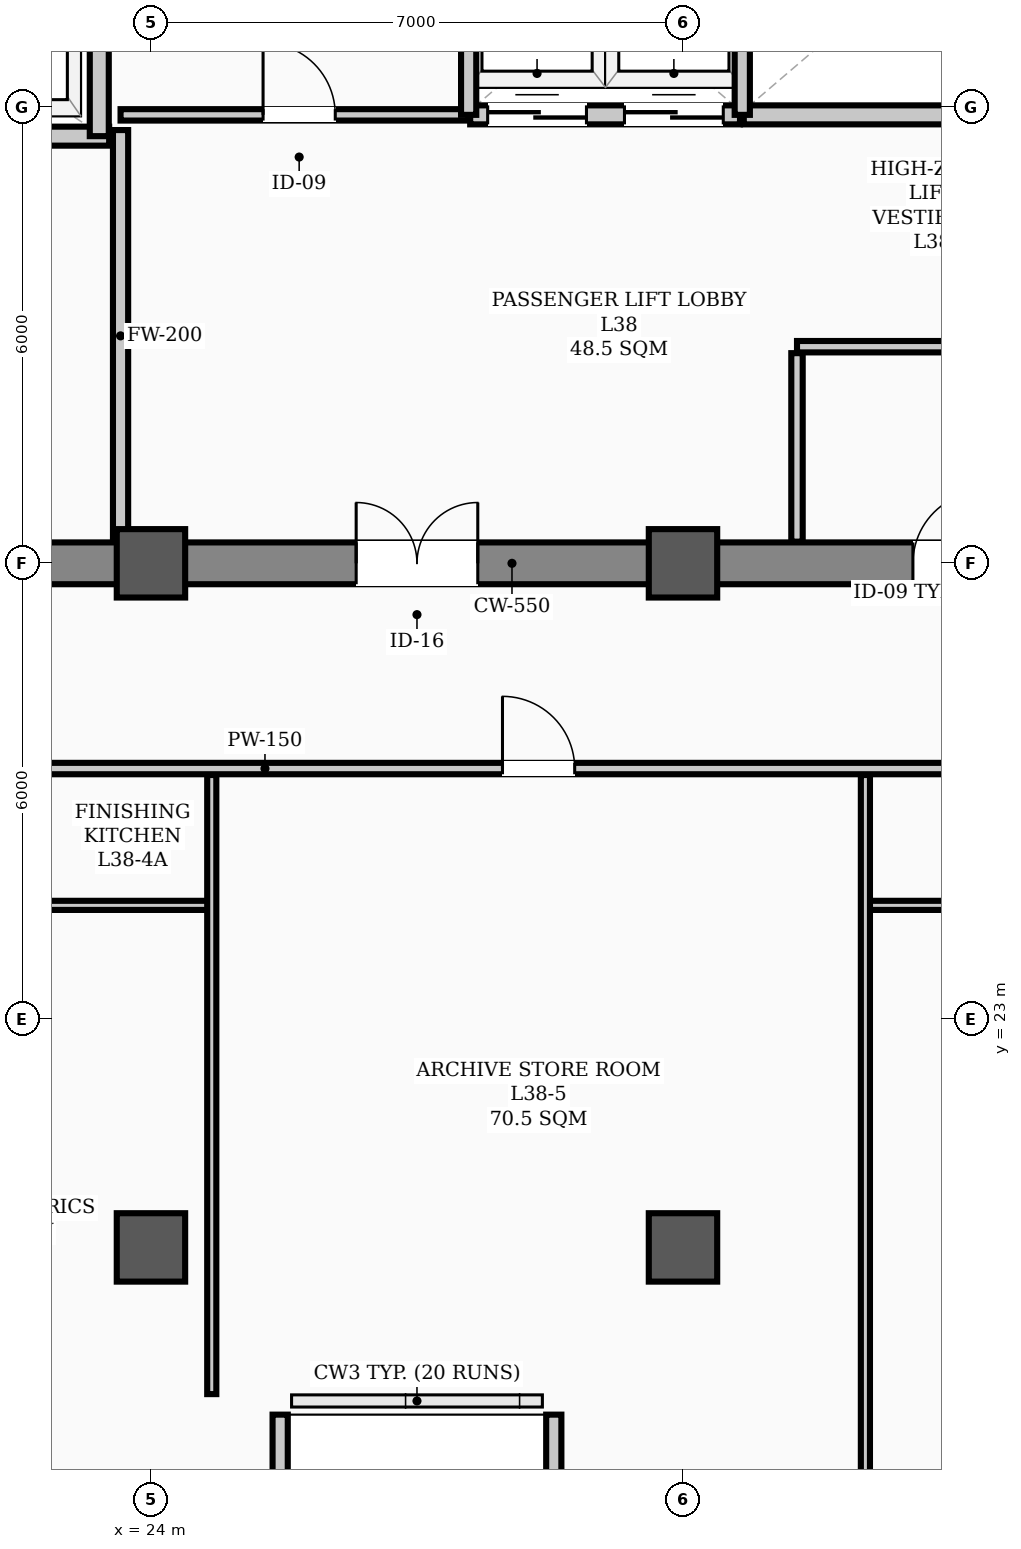
"""IFC4 building model, lengths in metres.
Left out: names, types, materials, properties, quantities, classifications, styles, units other than length and angle.
Written with IfcOpenShell. Run it as: python <this file> out.ifc"""

import sys

from ifc_helpers import new_model, si_unit, direction, frame, frame_2d, origin, origin_2d, place, context, subcontext, project, spatial, rectangle, hollow_rectangle, extrude, element, fill, save


model = new_model("IFC4")
c1 = context("Model", 3, precision=1e-05, world=origin(), true_north=direction((0.0, 1.0)))
c2 = subcontext(c1, "Body", "Model", "MODEL_VIEW")
j1 = project(units=[si_unit("LENGTHUNIT", "METRE"), si_unit("PLANEANGLEUNIT", "RADIAN")], contexts=[c1])
p1 = place(None, origin())
s1 = spatial("IfcSite", under=j1, at=p1, CompositionType="ELEMENT")
p2 = place(p1, origin())
s2 = spatial("IfcBuilding", under=s1, at=p2, CompositionType="ELEMENT")
p3 = place(p2, frame((0.0, 0.0, 153.9)))
s3 = spatial("IfcBuildingStorey", under=s2, at=p3, CompositionType="ELEMENT", Elevation=153.9)
for number, where, z_axis, x_axis in (
    (1, (24.0, 29.0, 0.0), (0.0, 0.0, 1.0), (1.0, 0.0, 0.0)),
    (2, (31.0, 29.0, 0.0), (0.0, 0.0, 1.0), (1.0, 0.0, 0.0)),
    (3, (24.0, 20.0, 0.0), (0.0, 0.0, 1.0), (1.0, 0.0, 0.0)),
    (4, (31.0, 20.0, 0.0), (0.0, 0.0, 1.0), (1.0, 0.0, 0.0)),
):
    element("IfcColumn", number, at=place(p3, frame(where, z_axis=z_axis, x_axis=x_axis)), inside=s3, PredefinedType="COLUMN", context=c2, shape_type="SweptSolid", body=[
        extrude(hollow_rectangle(XDim=0.9, YDim=0.9, WallThickness=0.035, InnerFilletRadius=0.017, OuterFilletRadius=0.052, at=origin_2d()), origin(), (0.0, 0.0, 1.0), 3.9),
    ])
for number, where, z_axis, x_axis in (
    (5, (25.7, 16.1, 0.0), (0.0, 0.0, 1.0), (0.0, 1.0, 0.0)),
    (6, (29.3, 17.8, 0.0), (0.0, 0.0, 1.0), (0.0, -1.0, 0.0)),
):
    element("IfcWall", number, at=place(p3, frame(where, z_axis=z_axis, x_axis=x_axis)), inside=s3, PredefinedType="PARAPET", context=c2, shape_type="SweptSolid", body=[
        extrude(rectangle(XDim=1.7, YDim=0.2, at=frame_2d((0.85, 0.0))), origin(), (0.0, 0.0, 1.0), 1.2),
    ])
p4 = place(p3, frame((13.5, 29.0, 0.0), z_axis=(0.0, 0.0, 1.0), x_axis=(1.0, 0.0, 0.0)))
e7 = element("IfcWall", 7, at=p4, inside=s3, PredefinedType="SHEAR", context=c2, shape_type="SweptSolid", body=[
    extrude(rectangle(XDim=30.5, YDim=0.55, at=frame_2d((15.25, 0.0))), origin(), (0.0, 0.0, 1.0), 3.72),
])
p5 = place(p4, frame((1.75, 0.0, 0.0)))
e8 = element("IfcOpeningElement", 8, at=p5, cuts=e7, PredefinedType="OPENING", context=c2, shape_type="SweptSolid", body=[
    extrude(rectangle(XDim=1.1, YDim=2.08, at=frame_2d((0.55, 1.04))), frame((0.0, 0.285, 0.0), z_axis=(0.0, -1.0, 0.0), x_axis=(1.0, 0.0, 0.0)), (0.0, 0.0, 1.0), 0.57),
])
p6 = place(p4, frame((26.7, 0.0, 0.0)))
e9 = element("IfcOpeningElement", 9, at=p6, cuts=e7, PredefinedType="OPENING", context=c2, shape_type="SweptSolid", body=[
    extrude(rectangle(XDim=1.1, YDim=2.08, at=frame_2d((0.55, 1.04))), frame((0.0, 0.285, 0.0), z_axis=(0.0, -1.0, 0.0), x_axis=(1.0, 0.0, 0.0)), (0.0, 0.0, 1.0), 0.57),
])
p7 = place(p4, frame((6.8, 0.0, 0.0)))
e10 = element("IfcOpeningElement", 10, at=p7, cuts=e7, PredefinedType="OPENING", context=c2, shape_type="SweptSolid", body=[
    extrude(rectangle(XDim=1.1, YDim=2.08, at=frame_2d((0.55, 1.04))), frame((0.0, 0.285, 0.0), z_axis=(0.0, -1.0, 0.0), x_axis=(1.0, 0.0, 0.0)), (0.0, 0.0, 1.0), 0.57),
])
p8 = place(p4, frame((13.2, 0.0, 0.0)))
e11 = element("IfcOpeningElement", 11, at=p8, cuts=e7, PredefinedType="OPENING", context=c2, shape_type="SweptSolid", body=[
    extrude(rectangle(XDim=1.6, YDim=2.08, at=frame_2d((0.8, 1.04))), frame((0.0, 0.285, 0.0), z_axis=(0.0, -1.0, 0.0), x_axis=(1.0, 0.0, 0.0)), (0.0, 0.0, 1.0), 0.57),
])
p9 = place(p4, frame((20.525, 0.0, 0.0)))
e12 = element("IfcOpeningElement", 12, at=p9, cuts=e7, PredefinedType="OPENING", context=c2, shape_type="SweptSolid", body=[
    extrude(rectangle(XDim=0.95, YDim=2.08, at=frame_2d((0.475, 1.04))), frame((0.0, 0.285, 0.0), z_axis=(0.0, -1.0, 0.0), x_axis=(1.0, 0.0, 0.0)), (0.0, 0.0, 1.0), 0.57),
])
p10 = place(p3, frame((18.1, 34.62, 0.0), z_axis=(0.0, 0.0, 1.0), x_axis=(1.0, 0.0, 0.0)))
e13 = element("IfcWall", 13, at=p10, inside=s3, PredefinedType="STANDARD", context=c2, shape_type="SweptSolid", body=[
    extrude(rectangle(XDim=5.35, YDim=0.25, at=frame_2d((2.675, 0.0))), origin(), (0.0, 0.0, 1.0), 3.72),
])
p11 = place(p10, frame((0.85, 0.0, 0.0)))
e14 = element("IfcOpeningElement", 14, at=p11, cuts=e13, PredefinedType="OPENING", context=c2, shape_type="SweptSolid", body=[
    extrude(rectangle(XDim=1.1, YDim=2.08, at=frame_2d((0.55, 1.04))), frame((0.0, 0.135, 0.0), z_axis=(0.0, -1.0, 0.0), x_axis=(1.0, 0.0, 0.0)), (0.0, 0.0, 1.0), 0.27),
])
p12 = place(p10, frame((3.45, 0.0, 0.0)))
e15 = element("IfcOpeningElement", 15, at=p12, cuts=e13, PredefinedType="OPENING", context=c2, shape_type="SweptSolid", body=[
    extrude(rectangle(XDim=1.1, YDim=2.08, at=frame_2d((0.55, 1.04))), frame((0.0, 0.135, 0.0), z_axis=(0.0, -1.0, 0.0), x_axis=(1.0, 0.0, 0.0)), (0.0, 0.0, 1.0), 0.27),
])
p13 = place(p3, frame((23.32, 34.62, 0.0), z_axis=(0.0, 0.0, 1.0), x_axis=(0.0, 1.0, 0.0)))
e16 = element("IfcWall", 16, at=p13, inside=s3, PredefinedType="STANDARD", context=c2, shape_type="SweptSolid", body=[
    extrude(rectangle(XDim=3.33, YDim=0.25, at=frame_2d((1.665, 0.0))), origin(), (0.0, 0.0, 1.0), 3.35),
])
p14 = place(p3, frame((28.2, 34.9, 0.0), z_axis=(0.0, 0.0, 1.0), x_axis=(1.0, 0.0, 0.0)))
e17 = element("IfcWall", 17, at=p14, inside=s3, PredefinedType="STANDARD", context=c2, shape_type="SweptSolid", body=[
    extrude(rectangle(XDim=3.55, YDim=0.25, at=frame_2d((1.775, 0.0))), origin(), (0.0, 0.0, 1.0), 3.72),
])
p15 = place(p14, frame((0.23, 0.0, 0.0)))
e18 = element("IfcOpeningElement", 18, at=p15, cuts=e17, PredefinedType="OPENING", context=c2, shape_type="SweptSolid", body=[
    extrude(rectangle(XDim=1.3, YDim=2.08, at=frame_2d((0.65, 1.04))), frame((0.0, 0.135, 0.0), z_axis=(0.0, -1.0, 0.0), x_axis=(1.0, 0.0, 0.0)), (0.0, 0.0, 1.0), 0.27),
])
p16 = place(p14, frame((2.03, 0.0, 0.0)))
e19 = element("IfcOpeningElement", 19, at=p16, cuts=e17, PredefinedType="OPENING", context=c2, shape_type="SweptSolid", body=[
    extrude(rectangle(XDim=1.3, YDim=2.08, at=frame_2d((0.65, 1.04))), frame((0.0, 0.135, 0.0), z_axis=(0.0, -1.0, 0.0), x_axis=(1.0, 0.0, 0.0)), (0.0, 0.0, 1.0), 0.27),
])
p17 = place(p3, frame((31.8, 34.9, 0.0), z_axis=(0.0, 0.0, 1.0), x_axis=(1.0, 0.0, 0.0)))
e20 = element("IfcWall", 20, at=p17, inside=s3, PredefinedType="STANDARD", context=c2, shape_type="SweptSolid", body=[
    extrude(rectangle(XDim=3.6, YDim=0.25, at=frame_2d((1.8, 0.0))), origin(), (0.0, 0.0, 1.0), 3.72),
])
p18 = place(p3, frame((23.6, 34.9, 0.0), z_axis=(0.0, 0.0, 1.0), x_axis=(1.0, 0.0, 0.0)))
e21 = element("IfcWall", 21, at=p18, inside=s3, PredefinedType="PARTITIONING", context=c2, shape_type="SweptSolid", body=[
    extrude(rectangle(XDim=4.58, YDim=0.15, at=frame_2d((2.29, 0.0))), origin(), (0.0, 0.0, 1.0), 3.72),
])
p19 = place(p18, frame((1.875, 0.0, 0.0)))
e22 = element("IfcOpeningElement", 22, at=p19, cuts=e21, PredefinedType="OPENING", context=c2, shape_type="SweptSolid", body=[
    extrude(rectangle(XDim=0.95, YDim=2.08, at=frame_2d((0.475, 1.04))), frame((0.0, 0.085, 0.0), z_axis=(0.0, -1.0, 0.0), x_axis=(1.0, 0.0, 0.0)), (0.0, 0.0, 1.0), 0.17),
])
p20 = place(p3, frame((32.5, 31.85, 0.0), z_axis=(0.0, 0.0, 1.0), x_axis=(1.0, 0.0, 0.0)))
e23 = element("IfcWall", 23, at=p20, inside=s3, PredefinedType="PARTITIONING", context=c2, shape_type="SweptSolid", body=[
    extrude(rectangle(XDim=4.1, YDim=0.15, at=frame_2d((2.05, 0.0))), origin(), (0.0, 0.0, 1.0), 3.72),
])
p21 = place(p3, frame((2.31, 26.3, 0.0), z_axis=(0.0, 0.0, 1.0), x_axis=(1.0, 0.0, 0.0)))
e24 = element("IfcWall", 24, at=p21, inside=s3, PredefinedType="PARTITIONING", context=c2, shape_type="SweptSolid", body=[
    extrude(rectangle(XDim=46.38, YDim=0.15, at=frame_2d((23.19, 0.0))), origin(), (0.0, 0.0, 1.0), 3.2),
])
p22 = place(p21, frame((9.19, 0.0, 0.0)))
e25 = element("IfcOpeningElement", 25, at=p22, cuts=e24, PredefinedType="OPENING", context=c2, shape_type="SweptSolid", body=[
    extrude(rectangle(XDim=0.95, YDim=2.08, at=frame_2d((0.475, 1.04))), frame((0.0, 0.085, 0.0), z_axis=(0.0, -1.0, 0.0), x_axis=(1.0, 0.0, 0.0)), (0.0, 0.0, 1.0), 0.17),
])
p23 = place(p21, frame((14.815, 0.0, 0.0)))
e26 = element("IfcOpeningElement", 26, at=p23, cuts=e24, PredefinedType="OPENING", context=c2, shape_type="SweptSolid", body=[
    extrude(rectangle(XDim=0.95, YDim=2.08, at=frame_2d((0.475, 1.04))), frame((0.0, 0.085, 0.0), z_axis=(0.0, -1.0, 0.0), x_axis=(1.0, 0.0, 0.0)), (0.0, 0.0, 1.0), 0.17),
])
p24 = place(p21, frame((19.015, 0.0, 0.0)))
e27 = element("IfcOpeningElement", 27, at=p24, cuts=e24, PredefinedType="OPENING", context=c2, shape_type="SweptSolid", body=[
    extrude(rectangle(XDim=0.95, YDim=2.08, at=frame_2d((0.475, 1.04))), frame((0.0, 0.085, 0.0), z_axis=(0.0, -1.0, 0.0), x_axis=(1.0, 0.0, 0.0)), (0.0, 0.0, 1.0), 0.17),
])
p25 = place(p21, frame((26.315, 0.0, 0.0)))
e28 = element("IfcOpeningElement", 28, at=p25, cuts=e24, PredefinedType="OPENING", context=c2, shape_type="SweptSolid", body=[
    extrude(rectangle(XDim=0.95, YDim=2.08, at=frame_2d((0.475, 1.04))), frame((0.0, 0.085, 0.0), z_axis=(0.0, -1.0, 0.0), x_axis=(1.0, 0.0, 0.0)), (0.0, 0.0, 1.0), 0.17),
])
p26 = place(p21, frame((32.915, 0.0, 0.0)))
e29 = element("IfcOpeningElement", 29, at=p26, cuts=e24, PredefinedType="OPENING", context=c2, shape_type="SweptSolid", body=[
    extrude(rectangle(XDim=0.95, YDim=2.08, at=frame_2d((0.475, 1.04))), frame((0.0, 0.085, 0.0), z_axis=(0.0, -1.0, 0.0), x_axis=(1.0, 0.0, 0.0)), (0.0, 0.0, 1.0), 0.17),
])
p27 = place(p21, frame((38.065, 0.0, 0.0)))
e30 = element("IfcOpeningElement", 30, at=p27, cuts=e24, PredefinedType="OPENING", context=c2, shape_type="SweptSolid", body=[
    extrude(rectangle(XDim=0.95, YDim=2.08, at=frame_2d((0.475, 1.04))), frame((0.0, 0.085, 0.0), z_axis=(0.0, -1.0, 0.0), x_axis=(1.0, 0.0, 0.0)), (0.0, 0.0, 1.0), 0.17),
])
p28 = place(p3, frame((20.6, 24.5, 0.0), z_axis=(0.0, 0.0, 1.0), x_axis=(1.0, 0.0, 0.0)))
e31 = element("IfcWall", 31, at=p28, inside=s3, PredefinedType="PARTITIONING", context=c2, shape_type="SweptSolid", body=[
    extrude(rectangle(XDim=4.2, YDim=0.12, at=frame_2d((2.1, 0.0))), origin(), (0.0, 0.0, 1.0), 3.2),
])
p29 = place(p28, frame((0.725, 0.0, 0.0)))
e32 = element("IfcOpeningElement", 32, at=p29, cuts=e31, PredefinedType="OPENING", context=c2, shape_type="SweptSolid", body=[
    extrude(rectangle(XDim=0.95, YDim=2.08, at=frame_2d((0.475, 1.04))), frame((0.0, 0.07, 0.0), z_axis=(0.0, -1.0, 0.0), x_axis=(1.0, 0.0, 0.0)), (0.0, 0.0, 1.0), 0.14),
])
p30 = place(p3, frame((33.4, 24.5, 0.0), z_axis=(0.0, 0.0, 1.0), x_axis=(1.0, 0.0, 0.0)))
e33 = element("IfcWall", 33, at=p30, inside=s3, PredefinedType="PARTITIONING", context=c2, shape_type="SweptSolid", body=[
    extrude(rectangle(XDim=6.4, YDim=0.12, at=frame_2d((3.2, 0.0))), origin(), (0.0, 0.0, 1.0), 3.2),
])
p31 = place(p30, frame((1.825, 0.0, 0.0)))
e34 = element("IfcOpeningElement", 34, at=p31, cuts=e33, PredefinedType="OPENING", context=c2, shape_type="SweptSolid", body=[
    extrude(rectangle(XDim=0.95, YDim=2.08, at=frame_2d((0.475, 1.04))), frame((0.0, 0.07, 0.0), z_axis=(0.0, -1.0, 0.0), x_axis=(1.0, 0.0, 0.0)), (0.0, 0.0, 1.0), 0.14),
])
p32 = place(p3, frame((23.6, 29.285, 0.0), z_axis=(0.0, 0.0, 1.0), x_axis=(0.0, 1.0, 0.0)))
e35 = element("IfcWall", 35, at=p32, inside=s3, PredefinedType="STANDARD", context=c2, shape_type="SweptSolid", body=[
    extrude(rectangle(XDim=5.415, YDim=0.2, at=frame_2d((2.708, 0.0))), origin(), (0.0, 0.0, 1.0), 3.2),
])
p33 = place(p3, frame((32.5, 29.285, 0.0), z_axis=(0.0, 0.0, 1.0), x_axis=(0.0, 1.0, 0.0)))
e36 = element("IfcWall", 36, at=p33, inside=s3, PredefinedType="PARTITIONING", context=c2, shape_type="SweptSolid", body=[
    extrude(rectangle(XDim=2.48, YDim=0.15, at=frame_2d((1.24, 0.0))), origin(), (0.0, 0.0, 1.0), 3.35),
])
p34 = place(p3, frame((24.8, 18.07, 0.0), z_axis=(0.0, 0.0, 1.0), x_axis=(0.0, 1.0, 0.0)))
e37 = element("IfcWall", 37, at=p34, inside=s3, PredefinedType="PARTITIONING", context=c2, shape_type="SweptSolid", body=[
    extrude(rectangle(XDim=8.145, YDim=0.12, at=frame_2d((4.073, 0.0))), origin(), (0.0, 0.0, 1.0), 3.1),
])
p35 = place(p3, frame((33.4, 16.31, 0.0), z_axis=(0.0, 0.0, 1.0), x_axis=(0.0, 1.0, 0.0)))
e38 = element("IfcWall", 38, at=p35, inside=s3, PredefinedType="PARTITIONING", context=c2, shape_type="SweptSolid", body=[
    extrude(rectangle(XDim=9.905, YDim=0.12, at=frame_2d((4.953, 0.0))), origin(), (0.0, 0.0, 1.0), 3.1),
])
for number, where, z_axis, x_axis in (
    (39, (28.18, 34.9, 0.0), (0.0, 0.0, 1.0), (0.0, 1.0, 0.0)),
    (40, (31.78, 34.9, 0.0), (0.0, 0.0, 1.0), (0.0, 1.0, 0.0)),
):
    element("IfcWall", number, at=place(p3, frame(where, z_axis=z_axis, x_axis=x_axis)), inside=s3, PredefinedType="STANDARD", context=c2, shape_type="SweptSolid", body=[
        extrude(rectangle(XDim=3.12, YDim=0.2, at=frame_2d((1.56, 0.0))), origin(), (0.0, 0.0, 1.0), 3.35),
    ])
p36 = place(p8, origin())
e41 = element("IfcDoor", 41, at=p36, inside=s3, OperationType="DOUBLE_DOOR_SINGLE_SWING", PredefinedType="DOOR", context=c2, shape_type="SweptSolid", body=[
    extrude(rectangle(XDim=1.6, YDim=2.08, at=frame_2d((0.8, 1.04))), frame((0.0, 0.025, 0.0), z_axis=(0.0, -1.0, 0.0), x_axis=(1.0, 0.0, 0.0)), (0.0, 0.0, 1.0), 0.05),
])
fill(e11, e41)
p37 = place(p19, origin())
e42 = element("IfcDoor", 42, at=p37, inside=s3, OperationType="SINGLE_SWING_LEFT", PredefinedType="DOOR", context=c2, shape_type="SweptSolid", body=[
    extrude(rectangle(XDim=0.95, YDim=2.08, at=frame_2d((0.475, 1.04))), frame((0.0, 0.025, 0.0), z_axis=(0.0, -1.0, 0.0), x_axis=(1.0, 0.0, 0.0)), (0.0, 0.0, 1.0), 0.05),
])
fill(e22, e42)
p38 = place(p9, origin())
e43 = element("IfcDoor", 43, at=p38, inside=s3, OperationType="SINGLE_SWING_RIGHT", PredefinedType="DOOR", context=c2, shape_type="SweptSolid", body=[
    extrude(rectangle(XDim=0.95, YDim=2.08, at=frame_2d((0.475, 1.04))), frame((0.0, 0.025, 0.0), z_axis=(0.0, -1.0, 0.0), x_axis=(1.0, 0.0, 0.0)), (0.0, 0.0, 1.0), 0.05),
])
fill(e12, e43)
p39 = place(p25, origin())
e44 = element("IfcDoor", 44, at=p39, inside=s3, OperationType="SINGLE_SWING_LEFT", PredefinedType="DOOR", context=c2, shape_type="SweptSolid", body=[
    extrude(rectangle(XDim=0.95, YDim=2.08, at=frame_2d((0.475, 1.04))), frame((0.0, 0.025, 0.0), z_axis=(0.0, -1.0, 0.0), x_axis=(1.0, 0.0, 0.0)), (0.0, 0.0, 1.0), 0.05),
])
fill(e28, e44)
p40 = place(p15, origin())
e45 = element("IfcDoor", 45, at=p40, inside=s3, OperationType="DOUBLE_DOOR_SLIDING", PredefinedType="DOOR", context=c2, shape_type="SweptSolid", body=[
    extrude(rectangle(XDim=1.3, YDim=2.08, at=frame_2d((0.65, 1.04))), frame((0.0, 0.025, 0.0), z_axis=(0.0, -1.0, 0.0), x_axis=(1.0, 0.0, 0.0)), (0.0, 0.0, 1.0), 0.05),
])
fill(e18, e45)
p41 = place(p16, origin())
e46 = element("IfcDoor", 46, at=p41, inside=s3, OperationType="DOUBLE_DOOR_SLIDING", PredefinedType="DOOR", context=c2, shape_type="SweptSolid", body=[
    extrude(rectangle(XDim=1.3, YDim=2.08, at=frame_2d((0.65, 1.04))), frame((0.0, 0.025, 0.0), z_axis=(0.0, -1.0, 0.0), x_axis=(1.0, 0.0, 0.0)), (0.0, 0.0, 1.0), 0.05),
])
fill(e19, e46)
save(model, sys.argv[1])
